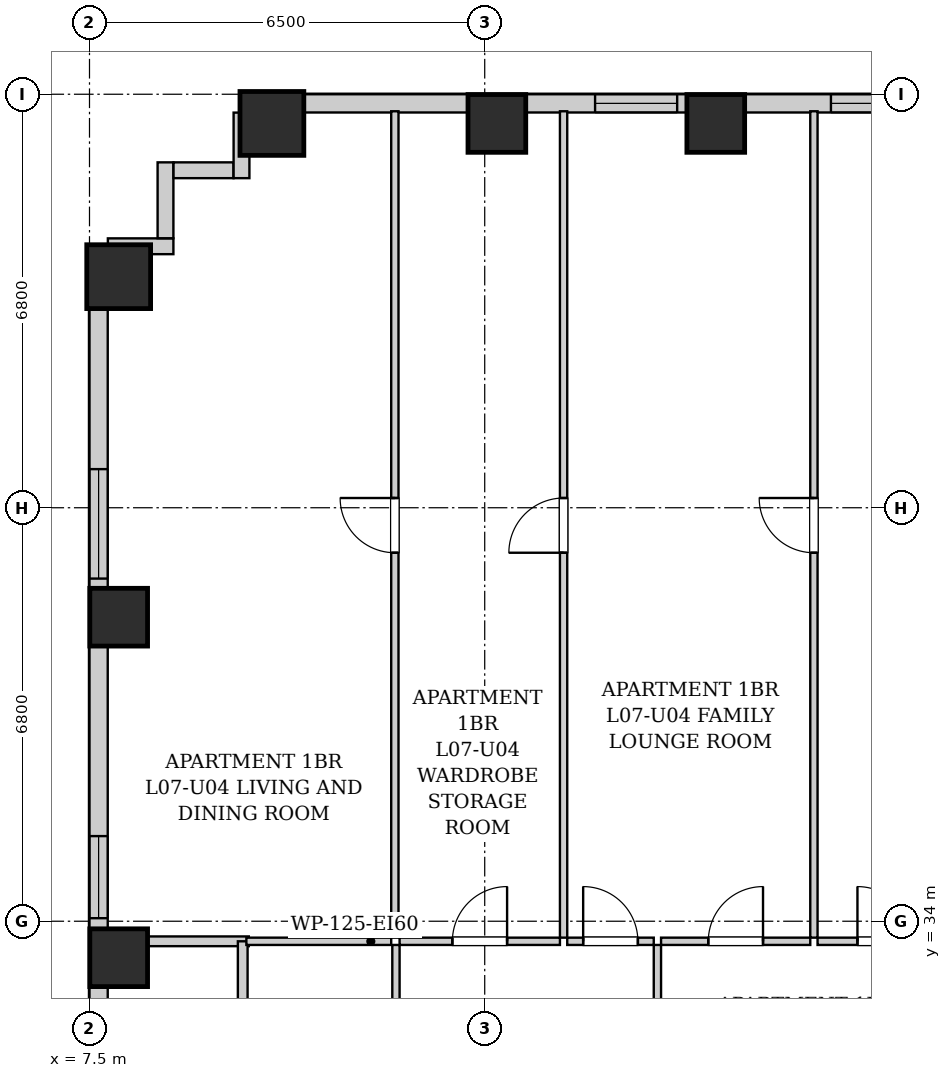
"""IFC4 building model, lengths in metres.
Left out: names, types, materials, properties, quantities, classifications, styles, units other than length and angle.
Written with IfcOpenShell. Run it as: python <this file> out.ifc"""

import sys

from ifc_helpers import new_model, si_unit, direction, frame, frame_2d, origin, origin_2d, place, context, subcontext, project, spatial, rectangle, extrude, element, fill, save


model = new_model("IFC4")
c1 = context("Model", 3, precision=1e-05, world=origin(), true_north=direction((0.0, 1.0)))
c2 = subcontext(c1, "Body", "Model", "MODEL_VIEW")
j1 = project(units=[si_unit("LENGTHUNIT", "METRE"), si_unit("PLANEANGLEUNIT", "RADIAN")], contexts=[c1])
p1 = place(None, origin())
s1 = spatial("IfcSite", under=j1, at=p1, CompositionType="ELEMENT")
p2 = place(p1, origin())
s2 = spatial("IfcBuilding", under=s1, at=p2, CompositionType="ELEMENT")
p3 = place(p2, frame((0.0, 0.0, 32.2)))
s3 = spatial("IfcBuildingStorey", under=s2, at=p3, CompositionType="ELEMENT", Elevation=32.2)
p4 = place(p3, frame((10.5, 47.12, 0.0), z_axis=(0.0, 0.0, 1.0), x_axis=(1.0, 0.0, 0.0)))
e1 = element("IfcColumn", 1, at=p4, inside=s3, PredefinedType="COLUMN", context=c2, shape_type="SweptSolid", body=[
    extrude(rectangle(XDim=1.05, YDim=1.05, at=origin_2d()), origin(), (0.0, 0.0, 1.0), 3.2),
])
for number, where, z_axis, x_axis in (
    (2, (14.2, 47.12, 0.0), (0.0, 0.0, 1.0), (1.0, 0.0, 0.0)),
    (3, (17.8, 47.12, 0.0), (0.0, 0.0, 1.0), (1.0, 0.0, 0.0)),
    (4, (7.98, 33.4, 0.0), (0.0, 0.0, 1.0), (1.0, 0.0, 0.0)),
    (5, (7.98, 39.0, 0.0), (0.0, 0.0, 1.0), (1.0, 0.0, 0.0)),
):
    element("IfcColumn", number, at=place(p3, frame(where, z_axis=z_axis, x_axis=x_axis)), inside=s3, PredefinedType="COLUMN", context=c2, shape_type="SweptSolid", body=[
        extrude(rectangle(XDim=0.95, YDim=0.95, at=origin_2d()), origin(), (0.0, 0.0, 1.0), 3.2),
    ])
p5 = place(p3, frame((7.98, 44.6, 0.0), z_axis=(0.0, 0.0, 1.0), x_axis=(1.0, 0.0, 0.0)))
e6 = element("IfcColumn", 6, at=p5, inside=s3, PredefinedType="COLUMN", context=c2, shape_type="SweptSolid", body=[
    extrude(rectangle(XDim=1.05, YDim=1.05, at=origin_2d()), origin(), (0.0, 0.0, 1.0), 3.2),
])
p6 = place(p3, frame((10.0, 47.45, 0.0), z_axis=(0.0, 0.0, 1.0), x_axis=(1.0, 0.0, 0.0)))
e7 = element("IfcWall", 7, at=p6, inside=s3, PredefinedType="SOLIDWALL", context=c2, shape_type="SweptSolid", body=[
    extrude(rectangle(XDim=26.9, YDim=0.3, at=frame_2d((13.45, 0.0))), origin(), (0.0, 0.0, 1.0), 1.975),
])
p7 = place(p6, frame((5.815, 0.0, 0.55)))
e8 = element("IfcOpeningElement", 8, at=p7, cuts=e7, PredefinedType="OPENING", context=c2, shape_type="SweptSolid", body=[
    extrude(rectangle(XDim=1.35, YDim=1.2, at=frame_2d((0.675, 0.6))), frame((0.0, 0.16, 0.0), z_axis=(0.0, -1.0, 0.0), x_axis=(1.0, 0.0, 0.0)), (0.0, 0.0, 1.0), 0.32),
])
p8 = place(p6, frame((9.694, 0.0, 0.55)))
e9 = element("IfcOpeningElement", 9, at=p8, cuts=e7, PredefinedType="OPENING", context=c2, shape_type="SweptSolid", body=[
    extrude(rectangle(XDim=1.8, YDim=1.2, at=frame_2d((0.9, 0.6))), frame((0.0, 0.16, 0.0), z_axis=(0.0, -1.0, 0.0), x_axis=(1.0, 0.0, 0.0)), (0.0, 0.0, 1.0), 0.32),
])
p9 = place(p6, frame((17.5, 0.0, 0.55)))
e10 = element("IfcOpeningElement", 10, at=p9, cuts=e7, PredefinedType="OPENING", context=c2, shape_type="SweptSolid", body=[
    extrude(rectangle(XDim=0.85, YDim=1.2, at=frame_2d((0.425, 0.6))), frame((0.0, 0.16, 0.0), z_axis=(0.0, -1.0, 0.0), x_axis=(1.0, 0.0, 0.0)), (0.0, 0.0, 1.0), 0.32),
])
p10 = place(p6, frame((19.463, 0.0, 0.55)))
e11 = element("IfcOpeningElement", 11, at=p10, cuts=e7, PredefinedType="OPENING", context=c2, shape_type="SweptSolid", body=[
    extrude(rectangle(XDim=1.8, YDim=1.2, at=frame_2d((0.9, 0.6))), frame((0.0, 0.16, 0.0), z_axis=(0.0, -1.0, 0.0), x_axis=(1.0, 0.0, 0.0)), (0.0, 0.0, 1.0), 0.32),
])
p11 = place(p6, frame((23.835, 0.0, 0.55)))
e12 = element("IfcOpeningElement", 12, at=p11, cuts=e7, PredefinedType="OPENING", context=c2, shape_type="SweptSolid", body=[
    extrude(rectangle(XDim=0.85, YDim=1.2, at=frame_2d((0.425, 0.6))), frame((0.0, 0.16, 0.0), z_axis=(0.0, -1.0, 0.0), x_axis=(1.0, 0.0, 0.0)), (0.0, 0.0, 1.0), 0.32),
])
p12 = place(p6, frame((25.498, 0.0, 0.55)))
e13 = element("IfcOpeningElement", 13, at=p12, cuts=e7, PredefinedType="OPENING", context=c2, shape_type="SweptSolid", body=[
    extrude(rectangle(XDim=0.85, YDim=1.2, at=frame_2d((0.425, 0.6))), frame((0.0, 0.16, 0.0), z_axis=(0.0, -1.0, 0.0), x_axis=(1.0, 0.0, 0.0)), (0.0, 0.0, 1.0), 0.32),
])
p13 = place(p3, frame((7.65, 2.5, 0.0), z_axis=(0.0, 0.0, 1.0), x_axis=(0.0, 1.0, 0.0)))
e14 = element("IfcWall", 14, at=p13, inside=s3, PredefinedType="SOLIDWALL", context=c2, shape_type="SweptSolid", body=[
    extrude(rectangle(XDim=42.6, YDim=0.3, at=frame_2d((21.3, 0.0))), origin(), (0.0, 0.0, 1.0), 1.975),
])
p14 = place(p13, frame((3.15, 0.0, 0.55)))
e15 = element("IfcOpeningElement", 15, at=p14, cuts=e14, PredefinedType="OPENING", context=c2, shape_type="SweptSolid", body=[
    extrude(rectangle(XDim=1.8, YDim=1.2, at=frame_2d((0.9, 0.6))), frame((0.0, 0.16, 0.0), z_axis=(0.0, -1.0, 0.0), x_axis=(1.0, 0.0, 0.0)), (0.0, 0.0, 1.0), 0.32),
])
p15 = place(p13, frame((1.185, 0.0, 0.55)))
e16 = element("IfcOpeningElement", 16, at=p15, cuts=e14, PredefinedType="OPENING", context=c2, shape_type="SweptSolid", body=[
    extrude(rectangle(XDim=1.35, YDim=1.2, at=frame_2d((0.675, 0.6))), frame((0.0, 0.16, 0.0), z_axis=(0.0, -1.0, 0.0), x_axis=(1.0, 0.0, 0.0)), (0.0, 0.0, 1.0), 0.32),
])
p16 = place(p13, frame((37.135, 0.0, 0.55)))
e17 = element("IfcOpeningElement", 17, at=p16, cuts=e14, PredefinedType="OPENING", context=c2, shape_type="SweptSolid", body=[
    extrude(rectangle(XDim=1.8, YDim=1.2, at=frame_2d((0.9, 0.6))), frame((0.0, 0.16, 0.0), z_axis=(0.0, -1.0, 0.0), x_axis=(1.0, 0.0, 0.0)), (0.0, 0.0, 1.0), 0.32),
])
p17 = place(p13, frame((31.55, 0.0, 0.55)))
e18 = element("IfcOpeningElement", 18, at=p17, cuts=e14, PredefinedType="OPENING", context=c2, shape_type="SweptSolid", body=[
    extrude(rectangle(XDim=1.35, YDim=1.2, at=frame_2d((0.675, 0.6))), frame((0.0, 0.16, 0.0), z_axis=(0.0, -1.0, 0.0), x_axis=(1.0, 0.0, 0.0)), (0.0, 0.0, 1.0), 0.32),
])
p18 = place(p13, frame((15.2, 0.0, 0.55)))
e19 = element("IfcOpeningElement", 19, at=p18, cuts=e14, PredefinedType="OPENING", context=c2, shape_type="SweptSolid", body=[
    extrude(rectangle(XDim=1.8, YDim=1.2, at=frame_2d((0.9, 0.6))), frame((0.0, 0.16, 0.0), z_axis=(0.0, -1.0, 0.0), x_axis=(1.0, 0.0, 0.0)), (0.0, 0.0, 1.0), 0.32),
])
p19 = place(p13, frame((13.135, 0.0, 0.55)))
e20 = element("IfcOpeningElement", 20, at=p19, cuts=e14, PredefinedType="OPENING", context=c2, shape_type="SweptSolid", body=[
    extrude(rectangle(XDim=1.35, YDim=1.2, at=frame_2d((0.675, 0.6))), frame((0.0, 0.16, 0.0), z_axis=(0.0, -1.0, 0.0), x_axis=(1.0, 0.0, 0.0)), (0.0, 0.0, 1.0), 0.32),
])
p20 = place(p13, frame((22.575, 0.0, 0.55)))
e21 = element("IfcOpeningElement", 21, at=p20, cuts=e14, PredefinedType="OPENING", context=c2, shape_type="SweptSolid", body=[
    extrude(rectangle(XDim=1.8, YDim=1.2, at=frame_2d((0.9, 0.6))), frame((0.0, 0.16, 0.0), z_axis=(0.0, -1.0, 0.0), x_axis=(1.0, 0.0, 0.0)), (0.0, 0.0, 1.0), 0.32),
])
p21 = place(p3, frame((7.802, 45.1, 0.0), z_axis=(0.0, 0.0, 1.0), x_axis=(1.0, 0.0, 0.0)))
e22 = element("IfcWall", 22, at=p21, inside=s3, PredefinedType="SOLIDWALL", context=c2, shape_type="SweptSolid", body=[
    extrude(rectangle(XDim=1.078, YDim=0.26, at=frame_2d((0.539, 0.0))), origin(), (0.0, 0.0, 1.0), 2.94),
])
p22 = place(p3, frame((8.75, 45.232, 0.0), z_axis=(0.0, 0.0, 1.0), x_axis=(0.0, 1.0, 0.0)))
e23 = element("IfcWall", 23, at=p22, inside=s3, PredefinedType="SOLIDWALL", context=c2, shape_type="SweptSolid", body=[
    extrude(rectangle(XDim=1.248, YDim=0.26, at=frame_2d((0.624, 0.0))), origin(), (0.0, 0.0, 1.0), 2.94),
])
p23 = place(p3, frame((8.882, 46.35, 0.0), z_axis=(0.0, 0.0, 1.0), x_axis=(1.0, 0.0, 0.0)))
e24 = element("IfcWall", 24, at=p23, inside=s3, PredefinedType="SOLIDWALL", context=c2, shape_type="SweptSolid", body=[
    extrude(rectangle(XDim=0.986, YDim=0.26, at=frame_2d((0.493, 0.0))), origin(), (0.0, 0.0, 1.0), 2.94),
])
p24 = place(p3, frame((10.0, 46.22, 0.0), z_axis=(0.0, 0.0, 1.0), x_axis=(0.0, 1.0, 0.0)))
e25 = element("IfcWall", 25, at=p24, inside=s3, PredefinedType="SOLIDWALL", context=c2, shape_type="SweptSolid", body=[
    extrude(rectangle(XDim=1.078, YDim=0.26, at=frame_2d((0.539, 0.0))), origin(), (0.0, 0.0, 1.0), 2.94),
])
p25 = place(p3, frame((7.78, 33.67, 0.0), z_axis=(0.0, 0.0, 1.0), x_axis=(1.0, 0.0, 0.0)))
e26 = element("IfcWall", 26, at=p25, inside=s3, PredefinedType="PARTITIONING", context=c2, shape_type="SweptSolid", body=[
    extrude(rectangle(XDim=2.34, YDim=0.16, at=frame_2d((1.17, 0.0))), origin(), (0.0, 0.0, 1.0), 2.94),
])
p26 = place(p3, frame((10.02, 30.76, 0.0), z_axis=(0.0, 0.0, 1.0), x_axis=(0.0, 1.0, 0.0)))
e27 = element("IfcWall", 27, at=p26, inside=s3, PredefinedType="PARTITIONING", context=c2, shape_type="SweptSolid", body=[
    extrude(rectangle(XDim=2.91, YDim=0.16, at=frame_2d((1.455, 0.0))), origin(), (0.0, 0.0, 1.0), 2.94),
])
p27 = place(p3, frame((12.54, 30.76, 0.0), z_axis=(0.0, 0.0, 1.0), x_axis=(0.0, 1.0, 0.0)))
e28 = element("IfcWall", 28, at=p27, inside=s3, PredefinedType="PARTITIONING", context=c2, shape_type="SweptSolid", body=[
    extrude(rectangle(XDim=2.85, YDim=0.12, at=frame_2d((1.425, 0.0))), origin(), (0.0, 0.0, 1.0), 2.94),
])
p28 = place(p27, frame((0.995, 0.0, 0.0)))
e29 = element("IfcOpeningElement", 29, at=p28, cuts=e28, PredefinedType="OPENING", context=c2, shape_type="SweptSolid", body=[
    extrude(rectangle(XDim=0.86, YDim=2.05, at=frame_2d((0.43, 1.025))), frame((0.0, 0.07, 0.0), z_axis=(0.0, -1.0, 0.0), x_axis=(1.0, 0.0, 0.0)), (0.0, 0.0, 1.0), 0.14),
])
p29 = place(p3, frame((10.08, 33.67, 0.0), z_axis=(0.0, 0.0, 1.0), x_axis=(1.0, 0.0, 0.0)))
e30 = element("IfcWall", 30, at=p29, inside=s3, PredefinedType="PARTITIONING", context=c2, shape_type="SweptSolid", body=[
    extrude(rectangle(XDim=2.382, YDim=0.12, at=frame_2d((1.191, 0.0))), origin(), (0.0, 0.0, 1.0), 2.94),
])
p30 = place(p3, frame((16.84, 30.76, 0.0), z_axis=(0.0, 0.0, 1.0), x_axis=(0.0, 1.0, 0.0)))
e31 = element("IfcWall", 31, at=p30, inside=s3, PredefinedType="PARTITIONING", context=c2, shape_type="SweptSolid", body=[
    extrude(rectangle(XDim=2.85, YDim=0.12, at=frame_2d((1.425, 0.0))), origin(), (0.0, 0.0, 1.0), 2.94),
])
p31 = place(p30, frame((0.975, 0.0, 0.0)))
e32 = element("IfcOpeningElement", 32, at=p31, cuts=e31, PredefinedType="OPENING", context=c2, shape_type="SweptSolid", body=[
    extrude(rectangle(XDim=0.9, YDim=2.05, at=frame_2d((0.45, 1.025))), frame((0.0, 0.07, 0.0), z_axis=(0.0, -1.0, 0.0), x_axis=(1.0, 0.0, 0.0)), (0.0, 0.0, 1.0), 0.14),
])
p32 = place(p3, frame((12.6, 33.67, 0.0), z_axis=(0.0, 0.0, 1.0), x_axis=(1.0, 0.0, 0.0)))
e33 = element("IfcWall", 33, at=p32, inside=s3, PredefinedType="PARTITIONING", context=c2, shape_type="SweptSolid", body=[
    extrude(rectangle(XDim=2.637, YDim=0.12, at=frame_2d((1.318, 0.0))), origin(), (0.0, 0.0, 1.0), 2.94),
])
p33 = place(p32, frame((0.868, 0.0, 0.0)))
e34 = element("IfcOpeningElement", 34, at=p33, cuts=e33, PredefinedType="OPENING", context=c2, shape_type="SweptSolid", body=[
    extrude(rectangle(XDim=0.9, YDim=2.05, at=frame_2d((0.45, 1.025))), frame((0.0, 0.07, 0.0), z_axis=(0.0, -1.0, 0.0), x_axis=(1.0, 0.0, 0.0)), (0.0, 0.0, 1.0), 0.14),
])
p34 = place(p3, frame((15.357, 33.67, 0.0), z_axis=(0.0, 0.0, 1.0), x_axis=(1.0, 0.0, 0.0)))
e35 = element("IfcWall", 35, at=p34, inside=s3, PredefinedType="PARTITIONING", context=c2, shape_type="SweptSolid", body=[
    extrude(rectangle(XDim=1.423, YDim=0.12, at=frame_2d((0.711, 0.0))), origin(), (0.0, 0.0, 1.0), 2.94),
])
p35 = place(p34, frame((0.262, 0.0, 0.0)))
e36 = element("IfcOpeningElement", 36, at=p35, cuts=e35, PredefinedType="OPENING", context=c2, shape_type="SweptSolid", body=[
    extrude(rectangle(XDim=0.9, YDim=2.05, at=frame_2d((0.45, 1.025))), frame((0.0, 0.07, 0.0), z_axis=(0.0, -1.0, 0.0), x_axis=(1.0, 0.0, 0.0)), (0.0, 0.0, 1.0), 0.14),
])
p36 = place(p3, frame((16.9, 33.67, 0.0), z_axis=(0.0, 0.0, 1.0), x_axis=(1.0, 0.0, 0.0)))
e37 = element("IfcWall", 37, at=p36, inside=s3, PredefinedType="PARTITIONING", context=c2, shape_type="SweptSolid", body=[
    extrude(rectangle(XDim=2.454, YDim=0.12, at=frame_2d((1.227, 0.0))), origin(), (0.0, 0.0, 1.0), 2.94),
])
p37 = place(p36, frame((0.777, 0.0, 0.0)))
e38 = element("IfcOpeningElement", 38, at=p37, cuts=e37, PredefinedType="OPENING", context=c2, shape_type="SweptSolid", body=[
    extrude(rectangle(XDim=0.9, YDim=2.05, at=frame_2d((0.45, 1.025))), frame((0.0, 0.07, 0.0), z_axis=(0.0, -1.0, 0.0), x_axis=(1.0, 0.0, 0.0)), (0.0, 0.0, 1.0), 0.14),
])
p38 = place(p3, frame((19.474, 33.67, 0.0), z_axis=(0.0, 0.0, 1.0), x_axis=(1.0, 0.0, 0.0)))
e39 = element("IfcWall", 39, at=p38, inside=s3, PredefinedType="PARTITIONING", context=c2, shape_type="SweptSolid", body=[
    extrude(rectangle(XDim=2.212, YDim=0.12, at=frame_2d((1.106, 0.0))), origin(), (0.0, 0.0, 1.0), 2.94),
])
p39 = place(p38, frame((0.656, 0.0, 0.0)))
e40 = element("IfcOpeningElement", 40, at=p39, cuts=e39, PredefinedType="OPENING", context=c2, shape_type="SweptSolid", body=[
    extrude(rectangle(XDim=0.9, YDim=2.05, at=frame_2d((0.45, 1.025))), frame((0.0, 0.07, 0.0), z_axis=(0.0, -1.0, 0.0), x_axis=(1.0, 0.0, 0.0)), (0.0, 0.0, 1.0), 0.14),
])
p40 = place(p3, frame((12.522, 33.73, 0.0), z_axis=(0.0, 0.0, 1.0), x_axis=(0.0, 1.0, 0.0)))
e41 = element("IfcWall", 41, at=p40, inside=s3, PredefinedType="PARTITIONING", context=c2, shape_type="SweptSolid", body=[
    extrude(rectangle(XDim=13.59, YDim=0.12, at=frame_2d((6.795, 0.0))), origin(), (0.0, 0.0, 1.0), 2.94),
])
p41 = place(p40, frame((6.33, 0.0, 0.0)))
e42 = element("IfcOpeningElement", 42, at=p41, cuts=e41, PredefinedType="OPENING", context=c2, shape_type="SweptSolid", body=[
    extrude(rectangle(XDim=0.9, YDim=2.05, at=frame_2d((0.45, 1.025))), frame((0.0, 0.07, 0.0), z_axis=(0.0, -1.0, 0.0), x_axis=(1.0, 0.0, 0.0)), (0.0, 0.0, 1.0), 0.14),
])
p42 = place(p3, frame((15.297, 33.73, 0.0), z_axis=(0.0, 0.0, 1.0), x_axis=(0.0, 1.0, 0.0)))
e43 = element("IfcWall", 43, at=p42, inside=s3, PredefinedType="PARTITIONING", context=c2, shape_type="SweptSolid", body=[
    extrude(rectangle(XDim=13.59, YDim=0.12, at=frame_2d((6.795, 0.0))), origin(), (0.0, 0.0, 1.0), 2.94),
])
p43 = place(p42, frame((6.33, 0.0, 0.0)))
e44 = element("IfcOpeningElement", 44, at=p43, cuts=e43, PredefinedType="OPENING", context=c2, shape_type="SweptSolid", body=[
    extrude(rectangle(XDim=0.9, YDim=2.05, at=frame_2d((0.45, 1.025))), frame((0.0, 0.07, 0.0), z_axis=(0.0, -1.0, 0.0), x_axis=(1.0, 0.0, 0.0)), (0.0, 0.0, 1.0), 0.14),
])
p44 = place(p3, frame((19.414, 33.73, 0.0), z_axis=(0.0, 0.0, 1.0), x_axis=(0.0, 1.0, 0.0)))
e45 = element("IfcWall", 45, at=p44, inside=s3, PredefinedType="PARTITIONING", context=c2, shape_type="SweptSolid", body=[
    extrude(rectangle(XDim=13.59, YDim=0.12, at=frame_2d((6.795, 0.0))), origin(), (0.0, 0.0, 1.0), 2.94),
])
p45 = place(p44, frame((6.33, 0.0, 0.0)))
e46 = element("IfcOpeningElement", 46, at=p45, cuts=e45, PredefinedType="OPENING", context=c2, shape_type="SweptSolid", body=[
    extrude(rectangle(XDim=0.9, YDim=2.05, at=frame_2d((0.45, 1.025))), frame((0.0, 0.07, 0.0), z_axis=(0.0, -1.0, 0.0), x_axis=(1.0, 0.0, 0.0)), (0.0, 0.0, 1.0), 0.14),
])
p46 = place(p33, origin())
e47 = element("IfcDoor", 47, at=p46, inside=s3, OperationType="SINGLE_SWING_RIGHT", PredefinedType="DOOR", context=c2, shape_type="SweptSolid", body=[
    extrude(rectangle(XDim=0.9, YDim=2.05, at=frame_2d((0.45, 1.025))), frame((0.0, 0.025, 0.0), z_axis=(0.0, -1.0, 0.0), x_axis=(1.0, 0.0, 0.0)), (0.0, 0.0, 1.0), 0.05),
])
fill(e34, e47)
p47 = place(p35, origin())
e48 = element("IfcDoor", 48, at=p47, inside=s3, OperationType="SINGLE_SWING_LEFT", PredefinedType="DOOR", context=c2, shape_type="SweptSolid", body=[
    extrude(rectangle(XDim=0.9, YDim=2.05, at=frame_2d((0.45, 1.025))), frame((0.0, 0.025, 0.0), z_axis=(0.0, -1.0, 0.0), x_axis=(1.0, 0.0, 0.0)), (0.0, 0.0, 1.0), 0.05),
])
fill(e36, e48)
p48 = place(p37, origin())
e49 = element("IfcDoor", 49, at=p48, inside=s3, OperationType="SINGLE_SWING_RIGHT", PredefinedType="DOOR", context=c2, shape_type="SweptSolid", body=[
    extrude(rectangle(XDim=0.9, YDim=2.05, at=frame_2d((0.45, 1.025))), frame((0.0, 0.025, 0.0), z_axis=(0.0, -1.0, 0.0), x_axis=(1.0, 0.0, 0.0)), (0.0, 0.0, 1.0), 0.05),
])
fill(e38, e49)
p49 = place(p39, origin())
e50 = element("IfcDoor", 50, at=p49, inside=s3, OperationType="SINGLE_SWING_LEFT", PredefinedType="DOOR", context=c2, shape_type="SweptSolid", body=[
    extrude(rectangle(XDim=0.9, YDim=2.05, at=frame_2d((0.45, 1.025))), frame((0.0, 0.025, 0.0), z_axis=(0.0, -1.0, 0.0), x_axis=(1.0, 0.0, 0.0)), (0.0, 0.0, 1.0), 0.05),
])
fill(e40, e50)
p50 = place(p41, origin())
e51 = element("IfcDoor", 51, at=p50, inside=s3, OperationType="SINGLE_SWING_RIGHT", PredefinedType="DOOR", context=c2, shape_type="SweptSolid", body=[
    extrude(rectangle(XDim=0.9, YDim=2.05, at=frame_2d((0.45, 1.025))), frame((0.0, 0.025, 0.0), z_axis=(0.0, -1.0, 0.0), x_axis=(1.0, 0.0, 0.0)), (0.0, 0.0, 1.0), 0.05),
])
fill(e42, e51)
p51 = place(p43, origin())
e52 = element("IfcDoor", 52, at=p51, inside=s3, OperationType="SINGLE_SWING_LEFT", PredefinedType="DOOR", context=c2, shape_type="SweptSolid", body=[
    extrude(rectangle(XDim=0.9, YDim=2.05, at=frame_2d((0.45, 1.025))), frame((0.0, 0.025, 0.0), z_axis=(0.0, -1.0, 0.0), x_axis=(1.0, 0.0, 0.0)), (0.0, 0.0, 1.0), 0.05),
])
fill(e44, e52)
p52 = place(p45, origin())
e53 = element("IfcDoor", 53, at=p52, inside=s3, OperationType="SINGLE_SWING_RIGHT", PredefinedType="DOOR", context=c2, shape_type="SweptSolid", body=[
    extrude(rectangle(XDim=0.9, YDim=2.05, at=frame_2d((0.45, 1.025))), frame((0.0, 0.025, 0.0), z_axis=(0.0, -1.0, 0.0), x_axis=(1.0, 0.0, 0.0)), (0.0, 0.0, 1.0), 0.05),
])
fill(e46, e53)
p53 = place(p16, origin())
e54 = element("IfcWindow", 54, at=p53, inside=s3, PartitioningType="DOUBLE_PANEL_VERTICAL", PredefinedType="WINDOW", context=c2, shape_type="SweptSolid", body=[
    extrude(rectangle(XDim=1.8, YDim=1.2, at=frame_2d((0.9, 0.6))), frame((0.0, 0.03, 0.0), z_axis=(0.0, -1.0, 0.0), x_axis=(1.0, 0.0, 0.0)), (0.0, 0.0, 1.0), 0.06),
])
fill(e17, e54)
p54 = place(p17, origin())
e55 = element("IfcWindow", 55, at=p54, inside=s3, PartitioningType="SINGLE_PANEL", PredefinedType="WINDOW", context=c2, shape_type="SweptSolid", body=[
    extrude(rectangle(XDim=1.35, YDim=1.2, at=frame_2d((0.675, 0.6))), frame((0.0, 0.03, 0.0), z_axis=(0.0, -1.0, 0.0), x_axis=(1.0, 0.0, 0.0)), (0.0, 0.0, 1.0), 0.06),
])
fill(e18, e55)
p55 = place(p7, origin())
e56 = element("IfcWindow", 56, at=p55, inside=s3, PartitioningType="SINGLE_PANEL", PredefinedType="WINDOW", context=c2, shape_type="SweptSolid", body=[
    extrude(rectangle(XDim=1.35, YDim=1.2, at=frame_2d((0.675, 0.6))), frame((0.0, 0.03, 0.0), z_axis=(0.0, -1.0, 0.0), x_axis=(1.0, 0.0, 0.0)), (0.0, 0.0, 1.0), 0.06),
])
fill(e8, e56)
p56 = place(p8, origin())
e57 = element("IfcWindow", 57, at=p56, inside=s3, PartitioningType="DOUBLE_PANEL_VERTICAL", PredefinedType="WINDOW", context=c2, shape_type="SweptSolid", body=[
    extrude(rectangle(XDim=1.8, YDim=1.2, at=frame_2d((0.9, 0.6))), frame((0.0, 0.03, 0.0), z_axis=(0.0, -1.0, 0.0), x_axis=(1.0, 0.0, 0.0)), (0.0, 0.0, 1.0), 0.06),
])
fill(e9, e57)
save(model, sys.argv[1])
